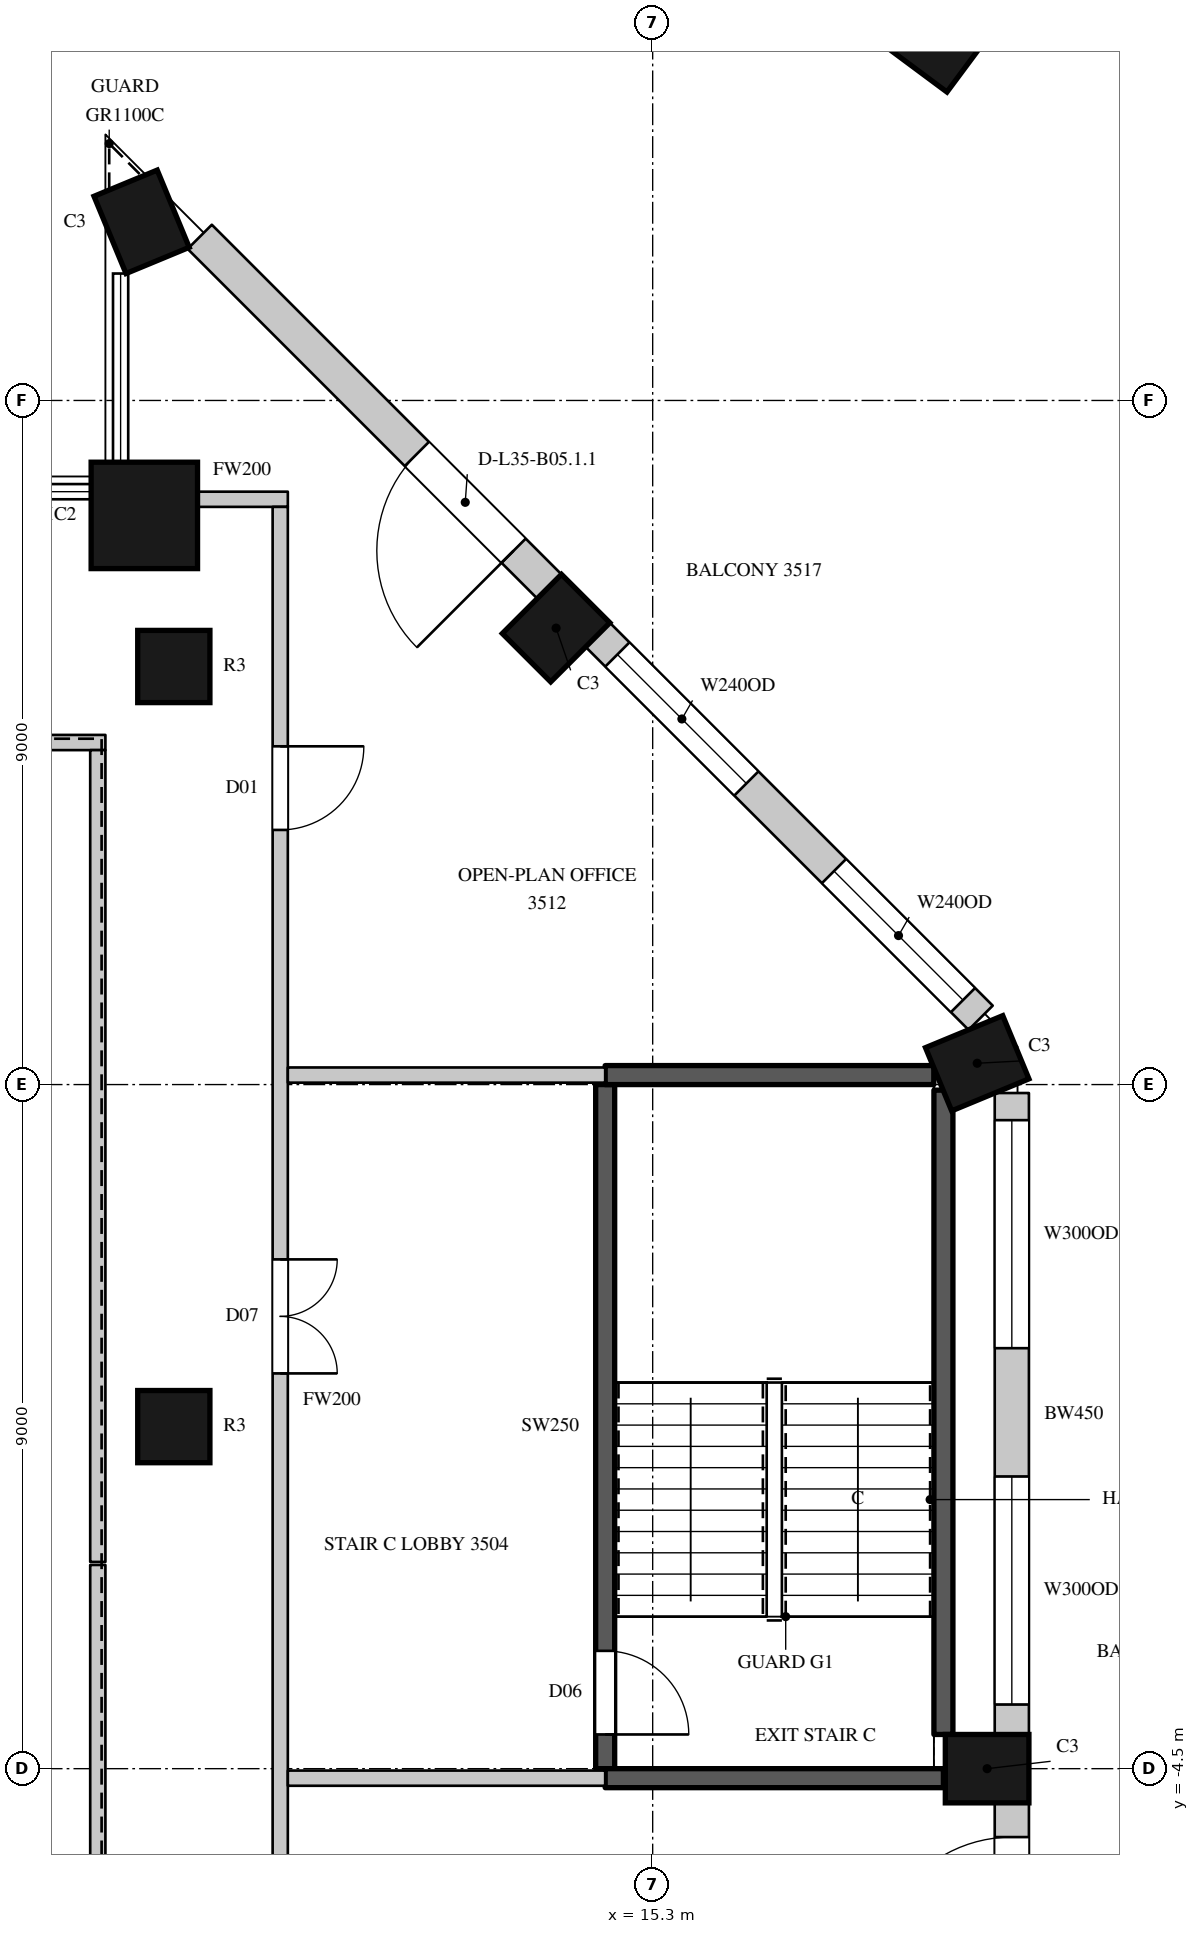
"""IFC4 building model, lengths in metres.
Left out: names, types, materials, properties, quantities, classifications, styles, units other than length and angle.
Written with IfcOpenShell. Run it as: python <this file> out.ifc"""

import sys

from ifc_helpers import new_model, si_unit, direction, frame, frame_2d, origin, origin_2d, place, context, subcontext, project, spatial, rectangle, circle, extrude, element, fill, save


model = new_model("IFC4")
c1 = context("Model", 3, precision=1e-05, world=origin(), true_north=direction((0.0, 1.0)))
c2 = subcontext(c1, "Body", "Model", "MODEL_VIEW")
j1 = project(units=[si_unit("LENGTHUNIT", "METRE"), si_unit("PLANEANGLEUNIT", "RADIAN")], contexts=[c1])
p1 = place(None, origin())
s1 = spatial("IfcSite", under=j1, at=p1, CompositionType="ELEMENT")
p2 = place(p1, origin())
s2 = spatial("IfcBuilding", under=s1, at=p2, CompositionType="ELEMENT")
p3 = place(p2, frame((0.0, 0.0, 164.6)))
s3 = spatial("IfcBuildingStorey", under=s2, at=p3, CompositionType="ELEMENT", Elevation=164.6)
for number, where, z_axis, x_axis in (
    (1, (19.7, -4.5, 0.0), (0.0, 0.0, 1.0), (0.0, 1.0, 0.0)),
    (2, (19.57, 4.78, 0.0), (0.0, 0.0, 1.0), (-0.383, 0.924, 0.0)),
    (3, (14.029, 10.505, 0.0), (0.0, 0.0, 1.0), (-0.707, 0.707, 0.0)),
    (4, (8.576, 15.85, 0.0), (0.0, 0.0, 1.0), (-0.924, -0.383, 0.0)),
):
    element("IfcColumn", number, at=place(p3, frame(where, z_axis=z_axis, x_axis=x_axis)), inside=s3, PredefinedType="COLUMN", context=c2, shape_type="SweptSolid", body=[
        extrude(rectangle(XDim=0.9, YDim=1.1, at=origin_2d()), origin(), (0.0, 0.0, 1.0), 4.1),
    ])
p4 = place(p3, frame((8.612, 11.988, 0.0), z_axis=(0.0, 0.0, 1.0), x_axis=(1.0, 0.0, 0.0)))
e5 = element("IfcColumn", 5, at=p4, inside=s3, PredefinedType="COLUMN", context=c2, shape_type="SweptSolid", body=[
    extrude(circle(Radius=0.7, at=origin_2d()), origin(), (0.0, 0.0, 1.0), 4.1),
])
p5 = place(p3, frame((19.138, 18.268, 0.0), z_axis=(0.0, 0.0, 1.0), x_axis=(-0.802798546114, 0.596250362144, 0.0)))
e6 = element("IfcColumn", 6, at=p5, inside=s3, PredefinedType="COLUMN", context=c2, shape_type="SweptSolid", body=[
    extrude(rectangle(XDim=0.9, YDim=1.1, at=origin_2d()), origin(), (0.0, 0.0, 1.0), 4.1),
])
for number, where, z_axis, x_axis in (
    (7, (9.0, 0.0, 0.0), (0.0, 0.0, 1.0), (1.0, 0.0, 0.0)),
    (8, (9.0, 10.0, 0.0), (0.0, 0.0, 1.0), (1.0, 0.0, 0.0)),
):
    element("IfcColumn", number, at=place(p3, frame(where, z_axis=z_axis, x_axis=x_axis)), inside=s3, PredefinedType="COLUMN", context=c2, shape_type="SweptSolid", body=[
        extrude(circle(Radius=0.475, at=origin_2d()), origin(), (0.0, 0.0, 1.0), 4.1),
    ])
p6 = place(p3, frame((20.025, -11.064, 0.0), z_axis=(0.0, 0.0, 1.0), x_axis=(0.0, 1.0, 0.0)))
e9 = element("IfcWall", 9, at=p6, inside=s3, PredefinedType="SOLIDWALL", context=c2, shape_type="SweptSolid", body=[
    extrude(rectangle(XDim=6.114, YDim=0.45, at=frame_2d((3.057, 0.0))), origin(), (0.0, 0.0, 1.0), 3.8),
])
p7 = place(p6, frame((3.864, 0.0, 0.0)))
e10 = element("IfcOpeningElement", 10, at=p7, cuts=e9, PredefinedType="OPENING", context=c2, shape_type="SweptSolid", body=[
    extrude(rectangle(XDim=1.8, YDim=2.4, at=frame_2d((0.9, 1.2))), frame((0.0, 0.235, 0.0), z_axis=(0.0, -1.0, 0.0), x_axis=(1.0, 0.0, 0.0)), (0.0, 0.0, 1.0), 0.47),
])
p8 = place(p3, frame((20.025, -4.05, 0.0), z_axis=(0.0, 0.0, 1.0), x_axis=(0.0, 1.0, 0.0)))
e11 = element("IfcWall", 11, at=p8, inside=s3, PredefinedType="SOLIDWALL", context=c2, shape_type="SweptSolid", body=[
    extrude(rectangle(XDim=8.439, YDim=0.45, at=frame_2d((4.219, 0.0))), origin(), (0.0, 0.0, 1.0), 3.8),
])
p9 = place(p8, frame((0.394, 0.0, 1.05)))
e12 = element("IfcOpeningElement", 12, at=p9, cuts=e11, PredefinedType="OPENING", context=c2, shape_type="SweptSolid", body=[
    extrude(rectangle(XDim=3.0, YDim=2.4, at=frame_2d((1.5, 1.2))), frame((0.0, 0.235, 0.0), z_axis=(0.0, -1.0, 0.0), x_axis=(1.0, 0.0, 0.0)), (0.0, 0.0, 1.0), 0.47),
])
p10 = place(p8, frame((5.082, 0.0, 1.05)))
e13 = element("IfcOpeningElement", 13, at=p10, cuts=e11, PredefinedType="OPENING", context=c2, shape_type="SweptSolid", body=[
    extrude(rectangle(XDim=3.0, YDim=2.4, at=frame_2d((1.5, 1.2))), frame((0.0, 0.235, 0.0), z_axis=(0.0, -1.0, 0.0), x_axis=(1.0, 0.0, 0.0)), (0.0, 0.0, 1.0), 0.47),
])
p11 = place(p3, frame((19.615, 5.379, 0.0), z_axis=(0.0, 0.0, 1.0), x_axis=(-0.707089646058, 0.7071239159, 0.0)))
e14 = element("IfcWall", 14, at=p11, inside=s3, PredefinedType="SOLIDWALL", context=c2, shape_type="SweptSolid", body=[
    extrude(rectangle(XDim=7.124, YDim=0.45, at=frame_2d((3.562, 0.0))), origin(), (0.0, 0.0, 1.0), 3.8),
])
p12 = place(p11, frame((0.328, 0.0, 1.05)))
e15 = element("IfcOpeningElement", 15, at=p12, cuts=e14, PredefinedType="OPENING", context=c2, shape_type="SweptSolid", body=[
    extrude(rectangle(XDim=2.4, YDim=2.4, at=frame_2d((1.2, 1.2))), frame((0.0, 0.235, 0.0), z_axis=(0.0, -1.0, 0.0), x_axis=(1.0, 0.0, 0.0)), (0.0, 0.0, 1.0), 0.47),
])
p13 = place(p11, frame((4.359, 0.0, 1.05)))
e16 = element("IfcOpeningElement", 16, at=p13, cuts=e14, PredefinedType="OPENING", context=c2, shape_type="SweptSolid", body=[
    extrude(rectangle(XDim=2.4, YDim=2.4, at=frame_2d((1.2, 1.2))), frame((0.0, 0.235, 0.0), z_axis=(0.0, -1.0, 0.0), x_axis=(1.0, 0.0, 0.0)), (0.0, 0.0, 1.0), 0.47),
])
p14 = place(p3, frame((13.941, 11.053, 0.0), z_axis=(0.0, 0.0, 1.0), x_axis=(-0.707106781187, 0.707106781187, 0.0)))
e17 = element("IfcWall", 17, at=p14, inside=s3, PredefinedType="SOLIDWALL", context=c2, shape_type="SweptSolid", body=[
    extrude(rectangle(XDim=6.505, YDim=0.45, at=frame_2d((3.252, 0.0))), origin(), (0.0, 0.0, 1.0), 3.8),
])
p15 = place(p14, frame((0.665, 0.0, 0.0)))
e18 = element("IfcOpeningElement", 18, at=p15, cuts=e17, PredefinedType="OPENING", context=c2, shape_type="SweptSolid", body=[
    extrude(rectangle(XDim=1.8, YDim=2.4, at=frame_2d((0.9, 1.2))), frame((0.0, 0.235, 0.0), z_axis=(0.0, -1.0, 0.0), x_axis=(1.0, 0.0, 0.0)), (0.0, 0.0, 1.0), 0.47),
])
p16 = place(p3, frame((21.1, -5.1, 0.0), z_axis=(0.0, 0.0, 1.0), x_axis=(0.0, 1.0, 0.0)))
e19 = element("IfcWall", 19, at=p16, inside=s3, PredefinedType="SOLIDWALL", context=c2, shape_type="SweptSolid", body=[
    extrude(rectangle(XDim=3.583, YDim=0.45, at=frame_2d((1.792, 0.0))), origin(), (0.0, 0.0, 1.0), 0.6),
])
p17 = place(p3, frame((21.1, -0.617, 0.0), z_axis=(0.0, 0.0, 1.0), x_axis=(0.0, 1.0, 0.0)))
e20 = element("IfcWall", 20, at=p17, inside=s3, PredefinedType="SOLIDWALL", context=c2, shape_type="SweptSolid", body=[
    extrude(rectangle(XDim=2.567, YDim=0.45, at=frame_2d((1.283, 0.0))), origin(), (0.0, 0.0, 1.0), 0.6),
])
p18 = place(p3, frame((18.65, 7.864, 0.0), z_axis=(0.0, 0.0, 1.0), x_axis=(-0.707059037574, 0.707154521576, 0.0)))
e21 = element("IfcWall", 21, at=p18, inside=s3, PredefinedType="SOLIDWALL", context=c2, shape_type="SweptSolid", body=[
    extrude(rectangle(XDim=2.557, YDim=0.45, at=frame_2d((1.278, 0.0))), origin(), (0.0, 0.0, 1.0), 0.6),
])
p19 = place(p3, frame((16.206, 10.308, 0.0), z_axis=(0.0, 0.0, 1.0), x_axis=(-0.707057827829, 0.707155731156, 0.0)))
e22 = element("IfcWall", 22, at=p19, inside=s3, PredefinedType="SOLIDWALL", context=c2, shape_type="SweptSolid", body=[
    extrude(rectangle(XDim=2.494, YDim=0.45, at=frame_2d((1.247, 0.0))), origin(), (0.0, 0.0, 1.0), 0.6),
])
p20 = place(p3, frame((12.251, 14.263, 0.0), z_axis=(0.0, 0.0, 1.0), x_axis=(-0.707039709166, 0.707173846846, 0.0)))
e23 = element("IfcWall", 23, at=p20, inside=s3, PredefinedType="SOLIDWALL", context=c2, shape_type="SweptSolid", body=[
    extrude(rectangle(XDim=1.82, YDim=0.45, at=frame_2d((0.91, 0.0))), origin(), (0.0, 0.0, 1.0), 0.6),
])
p21 = place(p3, frame((-6.1, 9.0, 0.0), z_axis=(0.0, 0.0, 1.0), x_axis=(1.0, 0.0, 0.0)))
e24 = element("IfcWall", 24, at=p21, inside=s3, PredefinedType="PARTITIONING", context=c2, shape_type="SweptSolid", body=[
    extrude(rectangle(XDim=14.2, YDim=0.2, at=frame_2d((7.1, 0.0))), origin(), (0.0, 0.0, 1.0), 3.8),
])
p22 = place(p3, frame((8.0, -8.9, 0.0), z_axis=(0.0, 0.0, 1.0), x_axis=(0.0, 1.0, 0.0)))
e25 = element("IfcWall", 25, at=p22, inside=s3, PredefinedType="PARTITIONING", context=c2, shape_type="SweptSolid", body=[
    extrude(rectangle(XDim=7.08, YDim=0.2, at=frame_2d((3.54, 0.0))), origin(), (0.0, 0.0, 1.0), 3.8),
])
p23 = place(p3, frame((8.0, -1.78, 0.0), z_axis=(0.0, 0.0, 1.0), x_axis=(0.0, 1.0, 0.0)))
e26 = element("IfcWall", 26, at=p23, inside=s3, PredefinedType="PARTITIONING", context=c2, shape_type="SweptSolid", body=[
    extrude(rectangle(XDim=10.68, YDim=0.2, at=frame_2d((5.34, 0.0))), origin(), (0.0, 0.0, 1.0), 3.8),
])
p24 = place(p3, frame((9.296, 12.2, 0.0), z_axis=(0.0, 0.0, 1.0), x_axis=(1.0, 0.0, 0.0)))
e27 = element("IfcWall", 27, at=p24, inside=s3, PredefinedType="PARTITIONING", context=c2, shape_type="SweptSolid", body=[
    extrude(rectangle(XDim=1.204, YDim=0.2, at=frame_2d((0.602, 0.0))), origin(), (0.0, 0.0, 1.0), 3.8),
])
p25 = place(p3, frame((10.4, -11.4, 0.0), z_axis=(0.0, 0.0, 1.0), x_axis=(0.0, 1.0, 0.0)))
e28 = element("IfcWall", 28, at=p25, inside=s3, PredefinedType="PARTITIONING", context=c2, shape_type="SweptSolid", body=[
    extrude(rectangle(XDim=23.5, YDim=0.2, at=frame_2d((11.75, 0.0))), origin(), (0.0, 0.0, 1.0), 3.8),
])
p26 = place(p25, frame((12.1, 0.0, 0.0)))
e29 = element("IfcOpeningElement", 29, at=p26, cuts=e28, PredefinedType="OPENING", context=c2, shape_type="SweptSolid", body=[
    extrude(rectangle(XDim=1.5, YDim=2.4, at=frame_2d((0.75, 1.2))), frame((0.0, 0.11, 0.0), z_axis=(0.0, -1.0, 0.0), x_axis=(1.0, 0.0, 0.0)), (0.0, 0.0, 1.0), 0.22),
])
p27 = place(p25, frame((19.25, 0.0, 0.0)))
e30 = element("IfcOpeningElement", 30, at=p27, cuts=e28, PredefinedType="OPENING", context=c2, shape_type="SweptSolid", body=[
    extrude(rectangle(XDim=1.1, YDim=2.4, at=frame_2d((0.55, 1.2))), frame((0.0, 0.11, 0.0), z_axis=(0.0, -1.0, 0.0), x_axis=(1.0, 0.0, 0.0)), (0.0, 0.0, 1.0), 0.22),
])
p28 = place(p25, frame((4.45, 0.0, 0.0)))
e31 = element("IfcOpeningElement", 31, at=p28, cuts=e28, PredefinedType="OPENING", context=c2, shape_type="SweptSolid", body=[
    extrude(rectangle(XDim=1.1, YDim=2.4, at=frame_2d((0.55, 1.2))), frame((0.0, 0.11, 0.0), z_axis=(0.0, -1.0, 0.0), x_axis=(1.0, 0.0, 0.0)), (0.0, 0.0, 1.0), 0.22),
])
for number, where, z_axis, x_axis in (
    (32, (10.5, -4.625, 0.0), (0.0, 0.0, 1.0), (1.0, 0.0, 0.0)),
    (33, (10.5, 4.625, 0.0), (0.0, 0.0, 1.0), (1.0, 0.0, 0.0)),
):
    element("IfcWall", number, at=place(p3, frame(where, z_axis=z_axis, x_axis=x_axis)), inside=s3, PredefinedType="PARTITIONING", context=c2, shape_type="SweptSolid", body=[
        extrude(rectangle(XDim=4.175, YDim=0.2, at=frame_2d((2.087, 0.0))), origin(), (0.0, 0.0, 1.0), 3.8),
    ])
p29 = place(p3, frame((14.675, -4.5, 0.0), z_axis=(0.0, 0.0, 1.0), x_axis=(0.0, 1.0, 0.0)))
e34 = element("IfcWall", 34, at=p29, inside=s3, PredefinedType="SHEAR", context=c2, shape_type="SweptSolid", body=[
    extrude(rectangle(XDim=9.0, YDim=0.25, at=frame_2d((4.5, 0.0))), origin(), (0.0, 0.0, 1.0), 3.8),
])
p30 = place(p29, frame((0.45, 0.0, 0.0)))
e35 = element("IfcOpeningElement", 35, at=p30, cuts=e34, PredefinedType="OPENING", context=c2, shape_type="SweptSolid", body=[
    extrude(rectangle(XDim=1.1, YDim=2.2, at=frame_2d((0.55, 1.1))), frame((0.0, 0.135, 0.0), z_axis=(0.0, -1.0, 0.0), x_axis=(1.0, 0.0, 0.0)), (0.0, 0.0, 1.0), 0.27),
])
p31 = place(p3, frame((14.675, -4.625, 0.0), z_axis=(0.0, 0.0, 1.0), x_axis=(1.0, 0.0, 0.0)))
e36 = element("IfcWall", 36, at=p31, inside=s3, PredefinedType="SHEAR", context=c2, shape_type="SweptSolid", body=[
    extrude(rectangle(XDim=4.45, YDim=0.25, at=frame_2d((2.225, 0.0))), origin(), (0.0, 0.0, 1.0), 3.8),
])
p32 = place(p3, frame((14.675, 4.625, 0.0), z_axis=(0.0, 0.0, 1.0), x_axis=(1.0, 0.0, 0.0)))
e37 = element("IfcWall", 37, at=p32, inside=s3, PredefinedType="SHEAR", context=c2, shape_type="SweptSolid", body=[
    extrude(rectangle(XDim=4.324, YDim=0.25, at=frame_2d((2.162, 0.0))), origin(), (0.0, 0.0, 1.0), 3.8),
])
p33 = place(p3, frame((19.125, -4.05, 0.0), z_axis=(0.0, 0.0, 1.0), x_axis=(0.0, 1.0, 0.0)))
e38 = element("IfcWall", 38, at=p33, inside=s3, PredefinedType="SHEAR", context=c2, shape_type="SweptSolid", body=[
    extrude(rectangle(XDim=8.477, YDim=0.25, at=frame_2d((4.238, 0.0))), origin(), (0.0, 0.0, 1.0), 3.8),
])
p34 = place(p7, origin())
e39 = element("IfcDoor", 39, at=p34, inside=s3, OperationType="SLIDING_TO_LEFT", PredefinedType="DOOR", context=c2, shape_type="SweptSolid", body=[
    extrude(rectangle(XDim=1.8, YDim=2.4, at=frame_2d((0.9, 1.2))), frame((0.0, 0.13, 0.0), z_axis=(0.0, -1.0, 0.0), x_axis=(1.0, 0.0, 0.0)), (0.0, 0.0, 1.0), 0.05),
])
fill(e10, e39)
p35 = place(p9, origin())
e40 = element("IfcWindow", 40, at=p35, inside=s3, PartitioningType="SINGLE_PANEL", PredefinedType="WINDOW", context=c2, shape_type="SweptSolid", body=[
    extrude(rectangle(XDim=3.0, YDim=2.4, at=frame_2d((1.5, 1.2))), frame((0.0, 0.135, 0.0), z_axis=(0.0, -1.0, 0.0), x_axis=(1.0, 0.0, 0.0)), (0.0, 0.0, 1.0), 0.06),
])
fill(e12, e40)
p36 = place(p10, origin())
e41 = element("IfcWindow", 41, at=p36, inside=s3, PartitioningType="SINGLE_PANEL", PredefinedType="WINDOW", context=c2, shape_type="SweptSolid", body=[
    extrude(rectangle(XDim=3.0, YDim=2.4, at=frame_2d((1.5, 1.2))), frame((0.0, 0.135, 0.0), z_axis=(0.0, -1.0, 0.0), x_axis=(1.0, 0.0, 0.0)), (0.0, 0.0, 1.0), 0.06),
])
fill(e13, e41)
p37 = place(p12, origin())
e42 = element("IfcWindow", 42, at=p37, inside=s3, PartitioningType="SINGLE_PANEL", PredefinedType="WINDOW", context=c2, shape_type="SweptSolid", body=[
    extrude(rectangle(XDim=2.4, YDim=2.4, at=frame_2d((1.2, 1.2))), frame((0.0, 0.135, 0.0), z_axis=(0.0, -1.0, 0.0), x_axis=(1.0, 0.0, 0.0)), (0.0, 0.0, 1.0), 0.06),
])
fill(e15, e42)
p38 = place(p13, origin())
e43 = element("IfcWindow", 43, at=p38, inside=s3, PartitioningType="SINGLE_PANEL", PredefinedType="WINDOW", context=c2, shape_type="SweptSolid", body=[
    extrude(rectangle(XDim=2.4, YDim=2.4, at=frame_2d((1.2, 1.2))), frame((0.0, 0.135, 0.0), z_axis=(0.0, -1.0, 0.0), x_axis=(1.0, 0.0, 0.0)), (0.0, 0.0, 1.0), 0.06),
])
fill(e16, e43)
p39 = place(p15, origin())
e44 = element("IfcDoor", 44, at=p39, inside=s3, OperationType="SLIDING_TO_LEFT", PredefinedType="DOOR", context=c2, shape_type="SweptSolid", body=[
    extrude(rectangle(XDim=1.8, YDim=2.4, at=frame_2d((0.9, 1.2))), frame((0.0, 0.13, 0.0), z_axis=(0.0, -1.0, 0.0), x_axis=(1.0, 0.0, 0.0)), (0.0, 0.0, 1.0), 0.05),
])
fill(e18, e44)
p40 = place(p26, origin())
e45 = element("IfcDoor", 45, at=p40, inside=s3, OperationType="DOUBLE_DOOR_SINGLE_SWING", PredefinedType="DOOR", context=c2, shape_type="SweptSolid", body=[
    extrude(rectangle(XDim=1.5, YDim=2.4, at=frame_2d((0.75, 1.2))), frame((0.0, 0.025, 0.0), z_axis=(0.0, -1.0, 0.0), x_axis=(1.0, 0.0, 0.0)), (0.0, 0.0, 1.0), 0.05),
])
fill(e29, e45)
p41 = place(p27, origin())
e46 = element("IfcDoor", 46, at=p41, inside=s3, OperationType="SINGLE_SWING_LEFT", PredefinedType="DOOR", context=c2, shape_type="SweptSolid", body=[
    extrude(rectangle(XDim=1.1, YDim=2.4, at=frame_2d((0.55, 1.2))), frame((0.0, 0.025, 0.0), z_axis=(0.0, -1.0, 0.0), x_axis=(1.0, 0.0, 0.0)), (0.0, 0.0, 1.0), 0.05),
])
fill(e30, e46)
p42 = place(p30, origin())
e47 = element("IfcDoor", 47, at=p42, inside=s3, OperationType="SINGLE_SWING_RIGHT", PredefinedType="DOOR", context=c2, shape_type="SweptSolid", body=[
    extrude(rectangle(XDim=1.1, YDim=2.2, at=frame_2d((0.55, 1.1))), frame((0.0, 0.025, 0.0), z_axis=(0.0, -1.0, 0.0), x_axis=(1.0, 0.0, 0.0)), (0.0, 0.0, 1.0), 0.05),
])
fill(e35, e47)
save(model, sys.argv[1])
